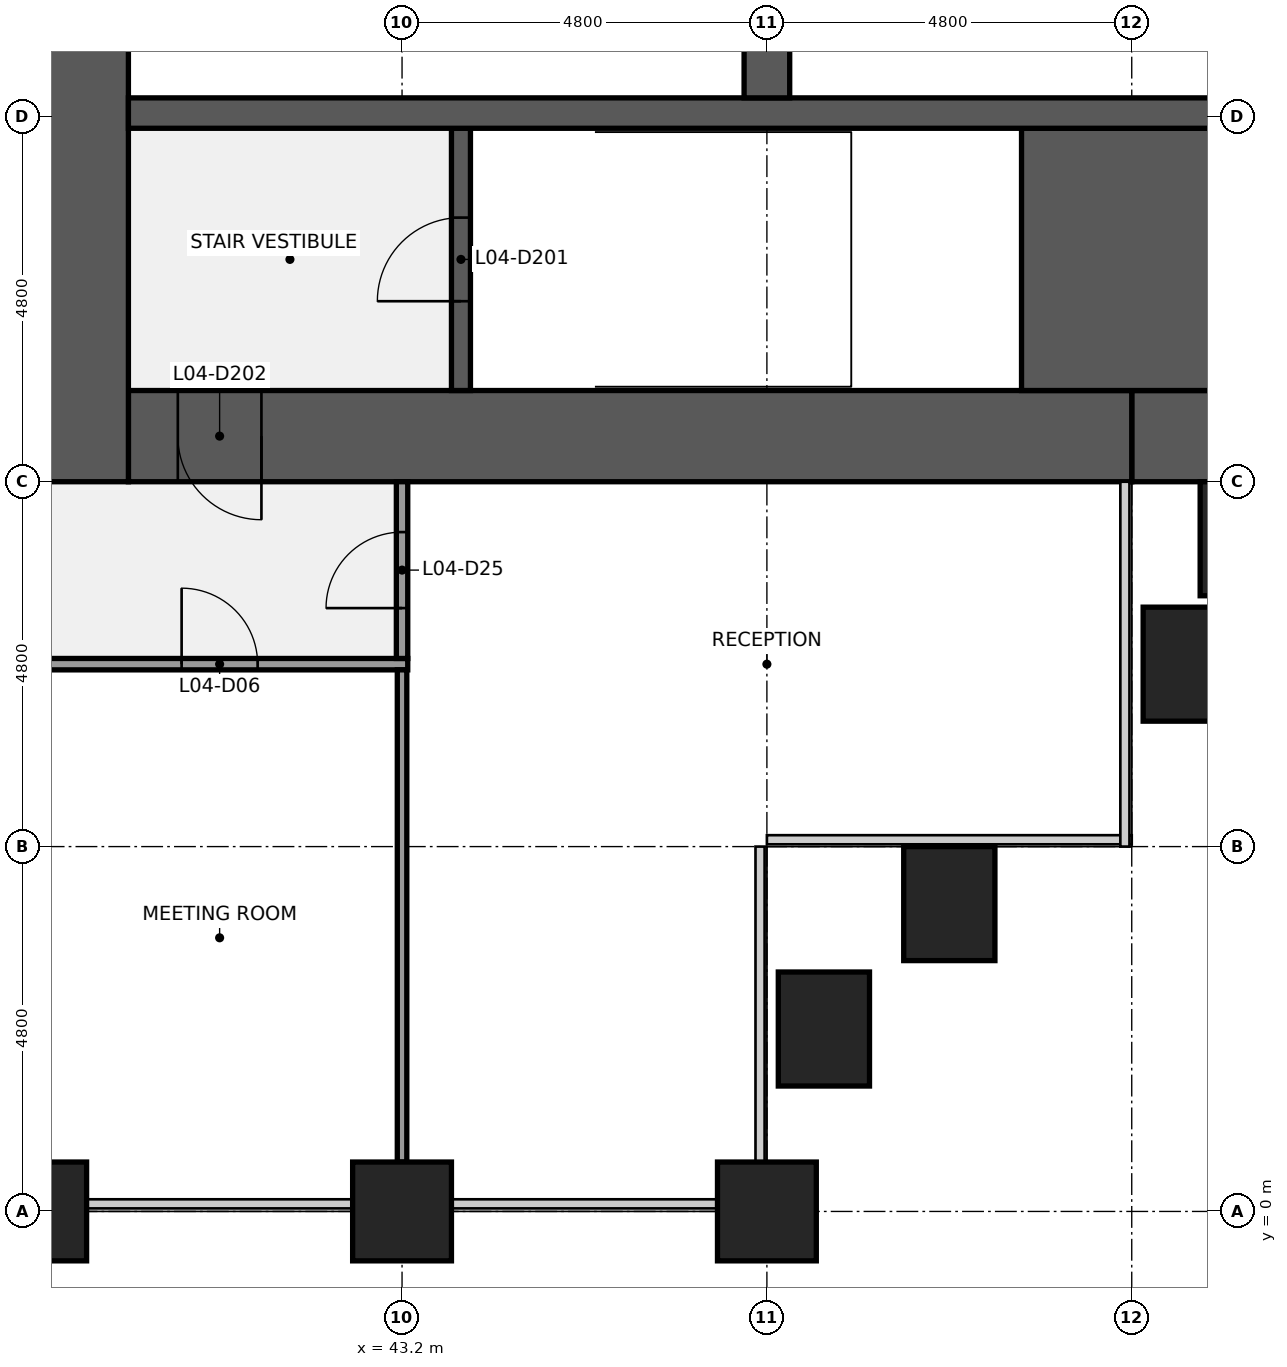
"""IFC4 building model, lengths in metres.
Left out: names, types, materials, properties, quantities, classifications, styles, units other than length and angle.
Written with IfcOpenShell. Run it as: python <this file> out.ifc"""

import sys

from ifc_helpers import new_model, si_unit, direction, frame, frame_2d, origin, origin_2d, place, context, subcontext, project, spatial, rectangle, extrude, element, fill, save


model = new_model("IFC4")
c1 = context("Model", 3, precision=1e-05, world=origin(), true_north=direction((0.0, 1.0)))
c2 = subcontext(c1, "Body", "Model", "MODEL_VIEW")
j1 = project(units=[si_unit("LENGTHUNIT", "METRE"), si_unit("PLANEANGLEUNIT", "RADIAN")], contexts=[c1])
p1 = place(None, origin())
s1 = spatial("IfcSite", under=j1, at=p1, CompositionType="ELEMENT")
p2 = place(p1, origin())
s2 = spatial("IfcBuilding", under=s1, at=p2, CompositionType="ELEMENT")
p3 = place(p2, frame((0.0, 0.0, 25.8)))
s3 = spatial("IfcBuildingStorey", under=s2, at=p3, CompositionType="ELEMENT", Elevation=25.8)
for number, where, z_axis, x_axis in (
    (1, (38.4, 0.0, 0.0), (0.0, 0.0, 1.0), (1.0, 0.0, 0.0)),
    (2, (43.2, 0.0, 0.0), (0.0, 0.0, 1.0), (1.0, 0.0, 0.0)),
    (3, (48.0, 0.0, 0.0), (0.0, 0.0, 1.0), (1.0, 0.0, 0.0)),
):
    element("IfcColumn", number, at=place(p3, frame(where, z_axis=z_axis, x_axis=x_axis)), inside=s3, PredefinedType="COLUMN", context=c2, shape_type="SweptSolid", body=[
        extrude(rectangle(XDim=1.3, YDim=1.3, at=origin_2d()), origin(), (0.0, 0.0, 1.0), 4.4),
    ])
p4 = place(p3, frame((56.4, 10.2, 0.0), z_axis=(0.0, 0.0, 1.0), x_axis=(-1.0, 0.0, 0.0)))
e4 = element("IfcWall", 4, at=p4, inside=s3, PredefinedType="SHEAR", context=c2, shape_type="SweptSolid", body=[
    extrude(rectangle(XDim=3.6, YDim=1.2, at=frame_2d((1.8, 0.0))), origin(), (0.0, 0.0, 1.0), 4.24),
])
p5 = place(p3, frame((52.8, 10.2, 0.0), z_axis=(0.0, 0.0, 1.0), x_axis=(-1.0, 0.0, 0.0)))
e5 = element("IfcWall", 5, at=p5, inside=s3, PredefinedType="SHEAR", context=c2, shape_type="SweptSolid", body=[
    extrude(rectangle(XDim=13.2, YDim=1.2, at=frame_2d((6.6, 0.0))), origin(), (0.0, 0.0, 1.0), 4.24),
])
p6 = place(p5, frame((11.45, 0.0, 0.0)))
e6 = element("IfcOpeningElement", 6, at=p6, cuts=e5, PredefinedType="OPENING", context=c2, shape_type="SweptSolid", body=[
    extrude(rectangle(XDim=1.1, YDim=2.1, at=frame_2d((0.55, 1.05))), frame((0.0, 0.61, 0.0), z_axis=(0.0, -1.0, 0.0), x_axis=(1.0, 0.0, 0.0)), (0.0, 0.0, 1.0), 1.22),
])
p7 = place(p3, frame((39.0, 9.6, 0.0), z_axis=(0.0, 0.0, 1.0), x_axis=(0.0, 1.0, 0.0)))
e7 = element("IfcWall", 7, at=p7, inside=s3, PredefinedType="SHEAR", context=c2, shape_type="SweptSolid", body=[
    extrude(rectangle(XDim=28.8, YDim=1.2, at=frame_2d((14.4, 0.0))), origin(), (0.0, 0.0, 1.0), 4.24),
])
p8 = place(p7, frame((8.7, 0.0, 0.0)))
e8 = element("IfcOpeningElement", 8, at=p8, cuts=e7, PredefinedType="OPENING", context=c2, shape_type="SweptSolid", body=[
    extrude(rectangle(XDim=1.8, YDim=2.1, at=frame_2d((0.9, 1.05))), frame((0.0, 0.61, 0.0), z_axis=(0.0, -1.0, 0.0), x_axis=(1.0, 0.0, 0.0)), (0.0, 0.0, 1.0), 1.22),
])
p9 = place(p7, frame((18.3, 0.0, 0.0)))
e9 = element("IfcOpeningElement", 9, at=p9, cuts=e7, PredefinedType="OPENING", context=c2, shape_type="SweptSolid", body=[
    extrude(rectangle(XDim=1.8, YDim=2.1, at=frame_2d((0.9, 1.05))), frame((0.0, 0.61, 0.0), z_axis=(0.0, -1.0, 0.0), x_axis=(1.0, 0.0, 0.0)), (0.0, 0.0, 1.0), 1.22),
])
p10 = place(p3, frame((51.35, 12.525, 0.0), z_axis=(0.0, 0.0, 1.0), x_axis=(1.0, 0.0, 0.0)))
e10 = element("IfcWall", 10, at=p10, inside=s3, PredefinedType="SHEAR", context=c2, shape_type="SweptSolid", body=[
    extrude(rectangle(XDim=5.05, YDim=3.45, at=frame_2d((2.525, 0.0))), origin(), (0.0, 0.0, 1.0), 4.24),
])
p11 = place(p3, frame((43.975, 10.8, 0.0), z_axis=(0.0, 0.0, 1.0), x_axis=(0.0, 1.0, 0.0)))
e11 = element("IfcWall", 11, at=p11, inside=s3, PredefinedType="SHEAR", context=c2, shape_type="SweptSolid", body=[
    extrude(rectangle(XDim=3.45, YDim=0.25, at=frame_2d((1.725, 0.0))), origin(), (0.0, 0.0, 1.0), 4.24),
])
p12 = place(p11, frame((1.175, 0.0, 0.0)))
e12 = element("IfcOpeningElement", 12, at=p12, cuts=e11, PredefinedType="OPENING", context=c2, shape_type="SweptSolid", body=[
    extrude(rectangle(XDim=1.1, YDim=2.1, at=frame_2d((0.55, 1.05))), frame((0.0, 0.135, 0.0), z_axis=(0.0, -1.0, 0.0), x_axis=(1.0, 0.0, 0.0)), (0.0, 0.0, 1.0), 0.27),
])
p13 = place(p3, frame((39.6, 14.45, 0.0), z_axis=(0.0, 0.0, 1.0), x_axis=(1.0, 0.0, 0.0)))
e13 = element("IfcWall", 13, at=p13, inside=s3, PredefinedType="SHEAR", context=c2, shape_type="SweptSolid", body=[
    extrude(rectangle(XDim=16.8, YDim=0.4, at=frame_2d((8.4, 0.0))), origin(), (0.0, 0.0, 1.0), 4.24),
])
p14 = place(p3, frame((48.0, 14.65, 0.0), z_axis=(0.0, 0.0, 1.0), x_axis=(0.0, 1.0, 0.0)))
e14 = element("IfcWall", 14, at=p14, inside=s3, PredefinedType="SHEAR", context=c2, shape_type="SweptSolid", body=[
    extrude(rectangle(XDim=2.6, YDim=0.6, at=frame_2d((1.3, 0.0))), origin(), (0.0, 0.0, 1.0), 4.24),
])
p15 = place(p3, frame((38.325, 7.2, 0.0), z_axis=(0.0, 0.0, 1.0), x_axis=(1.0, 0.0, 0.0)))
e15 = element("IfcWall", 15, at=p15, inside=s3, PredefinedType="PARTITIONING", context=c2, shape_type="SweptSolid", body=[
    extrude(rectangle(XDim=4.95, YDim=0.15, at=frame_2d((2.475, 0.0))), origin(), (0.0, 0.0, 1.0), 3.27),
])
p16 = place(p15, frame((1.975, 0.0, 0.0)))
e16 = element("IfcOpeningElement", 16, at=p16, cuts=e15, PredefinedType="OPENING", context=c2, shape_type="SweptSolid", body=[
    extrude(rectangle(XDim=1.0, YDim=2.1, at=frame_2d((0.5, 1.05))), frame((0.0, 0.085, 0.0), z_axis=(0.0, -1.0, 0.0), x_axis=(1.0, 0.0, 0.0)), (0.0, 0.0, 1.0), 0.17),
])
p17 = place(p3, frame((43.2, 0.65, 0.0), z_axis=(0.0, 0.0, 1.0), x_axis=(0.0, 1.0, 0.0)))
e17 = element("IfcWall", 17, at=p17, inside=s3, PredefinedType="PARTITIONING", context=c2, shape_type="SweptSolid", body=[
    extrude(rectangle(XDim=6.475, YDim=0.125, at=frame_2d((3.238, 0.0))), origin(), (0.0, 0.0, 1.0), 3.27),
])
p18 = place(p3, frame((43.2, 7.275, 0.0), z_axis=(0.0, 0.0, 1.0), x_axis=(0.0, 1.0, 0.0)))
e18 = element("IfcWall", 18, at=p18, inside=s3, PredefinedType="PARTITIONING", context=c2, shape_type="SweptSolid", body=[
    extrude(rectangle(XDim=2.325, YDim=0.15, at=frame_2d((1.163, 0.0))), origin(), (0.0, 0.0, 1.0), 3.27),
])
p19 = place(p18, frame((0.663, 0.0, 0.0)))
e19 = element("IfcOpeningElement", 19, at=p19, cuts=e18, PredefinedType="OPENING", context=c2, shape_type="SweptSolid", body=[
    extrude(rectangle(XDim=1.0, YDim=2.1, at=frame_2d((0.5, 1.05))), frame((0.0, 0.085, 0.0), z_axis=(0.0, -1.0, 0.0), x_axis=(1.0, 0.0, 0.0)), (0.0, 0.0, 1.0), 0.17),
])
for number, where, z_axis, x_axis in (
    (20, (48.75, 2.4, 0.0), (0.0, 0.0, 1.0), (0.0, 1.0, 0.0)),
    (21, (50.4, 4.05, 0.0), (0.0, 0.0, 1.0), (1.0, 0.0, 0.0)),
    (22, (53.55, 7.2, 0.0), (0.0, 0.0, 1.0), (0.0, 1.0, 0.0)),
):
    element("IfcColumn", number, at=place(p3, frame(where, z_axis=z_axis, x_axis=x_axis)), inside=s3, PredefinedType="PILASTER", context=c2, shape_type="SweptSolid", body=[
        extrude(rectangle(XDim=1.2, YDim=1.5, at=origin_2d()), origin(), (0.0, 0.0, 1.0), 4.4),
    ])
p20 = place(p3, frame((55.2, 8.85, 0.0), z_axis=(0.0, 0.0, 1.0), x_axis=(1.0, 0.0, 0.0)))
e23 = element("IfcColumn", 23, at=p20, inside=s3, PredefinedType="PILASTER", context=c2, shape_type="SweptSolid", body=[
    extrude(rectangle(XDim=3.0, YDim=1.5, at=origin_2d()), origin(), (0.0, 0.0, 1.0), 4.4),
])
for number, where, z_axis, x_axis in (
    (24, (38.4, -1.075, 0.0), (0.0, 0.0, 1.0), (1.0, 0.0, 0.0)),
    (25, (43.2, -1.075, 0.0), (0.0, 0.0, 1.0), (1.0, 0.0, 0.0)),
    (26, (48.0, -1.075, 0.0), (0.0, 0.0, 1.0), (1.0, 0.0, 0.0)),
):
    element("IfcColumn", number, at=place(p3, frame(where, z_axis=z_axis, x_axis=x_axis)), inside=s3, PredefinedType="PILASTER", context=c2, shape_type="SweptSolid", body=[
        extrude(rectangle(XDim=4.2, YDim=0.85, at=origin_2d()), origin(), (0.0, 0.0, 1.0), 4.4),
    ])
p21 = place(p12, origin())
e27 = element("IfcDoor", 27, at=p21, inside=s3, OperationType="SINGLE_SWING_LEFT", PredefinedType="DOOR", context=c2, shape_type="SweptSolid", body=[
    extrude(rectangle(XDim=1.1, YDim=2.1, at=frame_2d((0.55, 1.05))), frame((0.0, 0.025, 0.0), z_axis=(0.0, -1.0, 0.0), x_axis=(1.0, 0.0, 0.0)), (0.0, 0.0, 1.0), 0.05),
])
fill(e12, e27)
p22 = place(p6, origin())
e28 = element("IfcDoor", 28, at=p22, inside=s3, OperationType="SINGLE_SWING_LEFT", PredefinedType="DOOR", context=c2, shape_type="SweptSolid", body=[
    extrude(rectangle(XDim=1.1, YDim=2.1, at=frame_2d((0.55, 1.05))), frame((0.0, 0.025, 0.0), z_axis=(0.0, -1.0, 0.0), x_axis=(1.0, 0.0, 0.0)), (0.0, 0.0, 1.0), 0.05),
])
fill(e6, e28)
p23 = place(p16, origin())
e29 = element("IfcDoor", 29, at=p23, inside=s3, OperationType="SINGLE_SWING_LEFT", PredefinedType="DOOR", context=c2, shape_type="SweptSolid", body=[
    extrude(rectangle(XDim=1.0, YDim=2.1, at=frame_2d((0.5, 1.05))), frame((0.0, 0.025, 0.0), z_axis=(0.0, -1.0, 0.0), x_axis=(1.0, 0.0, 0.0)), (0.0, 0.0, 1.0), 0.05),
])
fill(e16, e29)
p24 = place(p19, origin())
e30 = element("IfcDoor", 30, at=p24, inside=s3, OperationType="SINGLE_SWING_LEFT", PredefinedType="DOOR", context=c2, shape_type="SweptSolid", body=[
    extrude(rectangle(XDim=1.0, YDim=2.1, at=frame_2d((0.5, 1.05))), frame((0.0, 0.025, 0.0), z_axis=(0.0, -1.0, 0.0), x_axis=(1.0, 0.0, 0.0)), (0.0, 0.0, 1.0), 0.05),
])
fill(e19, e30)
save(model, sys.argv[1])
